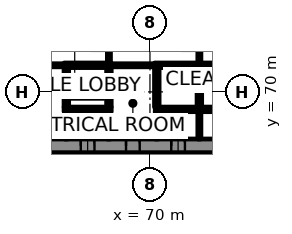
"""IFC4 building model, lengths in metres.
Left out: names, types, materials, properties, quantities, classifications, styles, units other than length and angle.
Written with IfcOpenShell. Run it as: python <this file> out.ifc"""

import sys

from ifc_helpers import new_model, si_unit, direction, frame, frame_2d, origin, place, context, subcontext, project, spatial, rectangle, extrude, element, fill, save


model = new_model("IFC4")
c1 = context("Model", 3, precision=1e-05, world=origin(), true_north=direction((0.0, 1.0)))
c2 = subcontext(c1, "Body", "Model", "MODEL_VIEW")
j1 = project(units=[si_unit("LENGTHUNIT", "METRE"), si_unit("PLANEANGLEUNIT", "RADIAN")], contexts=[c1])
p1 = place(None, origin())
s1 = spatial("IfcSite", under=j1, at=p1, CompositionType="ELEMENT")
p2 = place(p1, origin())
s2 = spatial("IfcBuilding", under=s1, at=p2, CompositionType="ELEMENT")
p3 = place(p2, origin())
s3 = spatial("IfcBuildingStorey", under=s2, at=p3, CompositionType="ELEMENT", Elevation=0.0)
p4 = place(p3, frame((62.0, 66.45, 0.0), z_axis=(0.0, 0.0, 1.0), x_axis=(1.0, 0.0, 0.0)))
e1 = element("IfcWall", 1, at=p4, inside=s3, PredefinedType="SHEAR", context=c2, shape_type="SweptSolid", body=[
    extrude(rectangle(XDim=26.0, YDim=0.9, at=frame_2d((13.0, 0.0))), origin(), (0.0, 0.0, 1.0), 7.7),
])
p5 = place(p4, frame((3.45, 0.0, 0.0)))
e2 = element("IfcOpeningElement", 2, at=p5, cuts=e1, PredefinedType="OPENING", context=c2, shape_type="SweptSolid", body=[
    extrude(rectangle(XDim=0.9, YDim=2.1, at=frame_2d((0.45, 1.05))), frame((0.0, 0.46, 0.0), z_axis=(0.0, -1.0, 0.0), x_axis=(1.0, 0.0, 0.0)), (0.0, 0.0, 1.0), 0.92),
])
p6 = place(p4, frame((6.425, 0.0, 0.0)))
e3 = element("IfcOpeningElement", 3, at=p6, cuts=e1, PredefinedType="OPENING", context=c2, shape_type="SweptSolid", body=[
    extrude(rectangle(XDim=0.9, YDim=2.1, at=frame_2d((0.45, 1.05))), frame((0.0, 0.46, 0.0), z_axis=(0.0, -1.0, 0.0), x_axis=(1.0, 0.0, 0.0)), (0.0, 0.0, 1.0), 0.92),
])
p7 = place(p4, frame((9.4, 0.0, 0.0)))
e4 = element("IfcOpeningElement", 4, at=p7, cuts=e1, PredefinedType="OPENING", context=c2, shape_type="SweptSolid", body=[
    extrude(rectangle(XDim=0.9, YDim=2.1, at=frame_2d((0.45, 1.05))), frame((0.0, 0.46, 0.0), z_axis=(0.0, -1.0, 0.0), x_axis=(1.0, 0.0, 0.0)), (0.0, 0.0, 1.0), 0.92),
])
p8 = place(p4, frame((14.262, 0.0, 0.0)))
e5 = element("IfcOpeningElement", 5, at=p8, cuts=e1, PredefinedType="OPENING", context=c2, shape_type="SweptSolid", body=[
    extrude(rectangle(XDim=0.9, YDim=2.1, at=frame_2d((0.45, 1.05))), frame((0.0, 0.46, 0.0), z_axis=(0.0, -1.0, 0.0), x_axis=(1.0, 0.0, 0.0)), (0.0, 0.0, 1.0), 0.92),
])
p9 = place(p4, frame((21.188, 0.0, 0.0)))
e6 = element("IfcOpeningElement", 6, at=p9, cuts=e1, PredefinedType="OPENING", context=c2, shape_type="SweptSolid", body=[
    extrude(rectangle(XDim=0.9, YDim=2.1, at=frame_2d((0.45, 1.05))), frame((0.0, 0.46, 0.0), z_axis=(0.0, -1.0, 0.0), x_axis=(1.0, 0.0, 0.0)), (0.0, 0.0, 1.0), 0.92),
])
p10 = place(p3, frame((64.35, 68.85, 0.0), z_axis=(0.0, 0.0, 1.0), x_axis=(1.0, 0.0, 0.0)))
e7 = element("IfcWall", 7, at=p10, inside=s3, PredefinedType="SHEAR", context=c2, shape_type="SweptSolid", body=[
    extrude(rectangle(XDim=3.1, YDim=0.3, at=frame_2d((1.55, 0.0))), origin(), (0.0, 0.0, 1.0), 7.7),
])
p11 = place(p3, frame((70.35, 68.85, 0.0), z_axis=(0.0, 0.0, 1.0), x_axis=(1.0, 0.0, 0.0)))
e8 = element("IfcWall", 8, at=p11, inside=s3, PredefinedType="SHEAR", context=c2, shape_type="SweptSolid", body=[
    extrude(rectangle(XDim=16.75, YDim=0.3, at=frame_2d((8.375, 0.0))), origin(), (0.0, 0.0, 1.0), 7.7),
])
p12 = place(p3, frame((64.35, 71.75, 0.0), z_axis=(0.0, 0.0, 1.0), x_axis=(1.0, 0.0, 0.0)))
e9 = element("IfcWall", 9, at=p12, inside=s3, PredefinedType="SHEAR", context=c2, shape_type="SweptSolid", body=[
    extrude(rectangle(XDim=3.1, YDim=0.3, at=frame_2d((1.55, 0.0))), origin(), (0.0, 0.0, 1.0), 7.7),
])
p13 = place(p12, frame((1.0, 0.0, 0.0)))
e10 = element("IfcOpeningElement", 10, at=p13, cuts=e9, PredefinedType="OPENING", context=c2, shape_type="SweptSolid", body=[
    extrude(rectangle(XDim=1.1, YDim=2.1, at=frame_2d((0.55, 1.05))), frame((0.0, 0.16, 0.0), z_axis=(0.0, -1.0, 0.0), x_axis=(1.0, 0.0, 0.0)), (0.0, 0.0, 1.0), 0.32),
])
p14 = place(p3, frame((70.3, 71.75, 0.0), z_axis=(0.0, 0.0, 1.0), x_axis=(1.0, 0.0, 0.0)))
e11 = element("IfcWall", 11, at=p14, inside=s3, PredefinedType="SHEAR", context=c2, shape_type="SweptSolid", body=[
    extrude(rectangle(XDim=16.8, YDim=0.3, at=frame_2d((8.4, 0.0))), origin(), (0.0, 0.0, 1.0), 7.7),
])
p15 = place(p14, frame((1.0, 0.0, 0.0)))
e12 = element("IfcOpeningElement", 12, at=p15, cuts=e11, PredefinedType="OPENING", context=c2, shape_type="SweptSolid", body=[
    extrude(rectangle(XDim=1.1, YDim=2.1, at=frame_2d((0.55, 1.05))), frame((0.0, 0.16, 0.0), z_axis=(0.0, -1.0, 0.0), x_axis=(1.0, 0.0, 0.0)), (0.0, 0.0, 1.0), 0.32),
])
p16 = place(p14, frame((3.8, 0.0, 0.0)))
e13 = element("IfcOpeningElement", 13, at=p16, cuts=e11, PredefinedType="OPENING", context=c2, shape_type="SweptSolid", body=[
    extrude(rectangle(XDim=1.1, YDim=2.1, at=frame_2d((0.55, 1.05))), frame((0.0, 0.16, 0.0), z_axis=(0.0, -1.0, 0.0), x_axis=(1.0, 0.0, 0.0)), (0.0, 0.0, 1.0), 0.32),
])
p17 = place(p14, frame((6.6, 0.0, 0.0)))
e14 = element("IfcOpeningElement", 14, at=p17, cuts=e11, PredefinedType="OPENING", context=c2, shape_type="SweptSolid", body=[
    extrude(rectangle(XDim=1.1, YDim=2.1, at=frame_2d((0.55, 1.05))), frame((0.0, 0.16, 0.0), z_axis=(0.0, -1.0, 0.0), x_axis=(1.0, 0.0, 0.0)), (0.0, 0.0, 1.0), 0.32),
])
p18 = place(p14, frame((9.4, 0.0, 0.0)))
e15 = element("IfcOpeningElement", 15, at=p18, cuts=e11, PredefinedType="OPENING", context=c2, shape_type="SweptSolid", body=[
    extrude(rectangle(XDim=1.1, YDim=2.1, at=frame_2d((0.55, 1.05))), frame((0.0, 0.16, 0.0), z_axis=(0.0, -1.0, 0.0), x_axis=(1.0, 0.0, 0.0)), (0.0, 0.0, 1.0), 0.32),
])
p19 = place(p14, frame((12.2, 0.0, 0.0)))
e16 = element("IfcOpeningElement", 16, at=p19, cuts=e11, PredefinedType="OPENING", context=c2, shape_type="SweptSolid", body=[
    extrude(rectangle(XDim=1.1, YDim=2.1, at=frame_2d((0.55, 1.05))), frame((0.0, 0.16, 0.0), z_axis=(0.0, -1.0, 0.0), x_axis=(1.0, 0.0, 0.0)), (0.0, 0.0, 1.0), 0.32),
])
p20 = place(p14, frame((14.925, 0.0, 0.0)))
e17 = element("IfcOpeningElement", 17, at=p20, cuts=e11, PredefinedType="OPENING", context=c2, shape_type="SweptSolid", body=[
    extrude(rectangle(XDim=1.1, YDim=2.1, at=frame_2d((0.55, 1.05))), frame((0.0, 0.16, 0.0), z_axis=(0.0, -1.0, 0.0), x_axis=(1.0, 0.0, 0.0)), (0.0, 0.0, 1.0), 0.32),
])
for number, where, z_axis, x_axis in (
    (18, (64.5, 69.0, 0.0), (0.0, 0.0, 1.0), (0.0, 1.0, 0.0)),
    (19, (67.3, 69.0, 0.0), (0.0, 0.0, 1.0), (0.0, 1.0, 0.0)),
    (20, (70.45, 69.0, 0.0), (0.0, 0.0, 1.0), (0.0, 1.0, 0.0)),
    (21, (73.25, 69.0, 0.0), (0.0, 0.0, 1.0), (0.0, 1.0, 0.0)),
):
    element("IfcWall", number, at=place(p3, frame(where, z_axis=z_axis, x_axis=x_axis)), inside=s3, PredefinedType="SHEAR", context=c2, shape_type="SweptSolid", body=[
        extrude(rectangle(XDim=2.6, YDim=0.3, at=frame_2d((1.3, 0.0))), origin(), (0.0, 0.0, 1.0), 7.7),
    ])
p21 = place(p3, frame((71.348, 110.424, 0.0), z_axis=(0.0, 0.0, 1.0), x_axis=(-0.500000550228, -0.86602508611, 0.0)))
e22 = element("IfcWall", 22, at=p21, inside=s3, PredefinedType="SOLIDWALL", context=c2, shape_type="SweptSolid", body=[
    extrude(rectangle(XDim=57.704, YDim=0.3, at=frame_2d((28.852, 0.0))), origin(), (0.0, 0.0, 1.0), 7.7),
])
p22 = place(p21, frame((16.711, 0.0, 0.0)))
e23 = element("IfcOpeningElement", 23, at=p22, cuts=e22, PredefinedType="OPENING", context=c2, shape_type="SweptSolid", body=[
    extrude(rectangle(XDim=1.2, YDim=2.4, at=frame_2d((0.6, 1.2))), frame((0.0, 0.16, 0.0), z_axis=(0.0, -1.0, 0.0), x_axis=(1.0, 0.0, 0.0)), (0.0, 0.0, 1.0), 0.32),
])
p23 = place(p21, frame((1.552, 0.0, 0.15)))
e24 = element("IfcOpeningElement", 24, at=p23, cuts=e22, PredefinedType="OPENING", context=c2, shape_type="SweptSolid", body=[
    extrude(rectangle(XDim=2.1, YDim=5.4, at=frame_2d((1.05, 2.7))), frame((0.0, 0.16, 0.0), z_axis=(0.0, -1.0, 0.0), x_axis=(1.0, 0.0, 0.0)), (0.0, 0.0, 1.0), 0.32),
])
p24 = place(p21, frame((4.052, 0.0, 0.15)))
e25 = element("IfcOpeningElement", 25, at=p24, cuts=e22, PredefinedType="OPENING", context=c2, shape_type="SweptSolid", body=[
    extrude(rectangle(XDim=2.1, YDim=5.4, at=frame_2d((1.05, 2.7))), frame((0.0, 0.16, 0.0), z_axis=(0.0, -1.0, 0.0), x_axis=(1.0, 0.0, 0.0)), (0.0, 0.0, 1.0), 0.32),
])
p25 = place(p21, frame((6.552, 0.0, 0.15)))
e26 = element("IfcOpeningElement", 26, at=p25, cuts=e22, PredefinedType="OPENING", context=c2, shape_type="SweptSolid", body=[
    extrude(rectangle(XDim=2.1, YDim=5.4, at=frame_2d((1.05, 2.7))), frame((0.0, 0.16, 0.0), z_axis=(0.0, -1.0, 0.0), x_axis=(1.0, 0.0, 0.0)), (0.0, 0.0, 1.0), 0.32),
])
p26 = place(p21, frame((9.052, 0.0, 0.15)))
e27 = element("IfcOpeningElement", 27, at=p26, cuts=e22, PredefinedType="OPENING", context=c2, shape_type="SweptSolid", body=[
    extrude(rectangle(XDim=2.1, YDim=5.4, at=frame_2d((1.05, 2.7))), frame((0.0, 0.16, 0.0), z_axis=(0.0, -1.0, 0.0), x_axis=(1.0, 0.0, 0.0)), (0.0, 0.0, 1.0), 0.32),
])
p27 = place(p21, frame((11.552, 0.0, 0.15)))
e28 = element("IfcOpeningElement", 28, at=p27, cuts=e22, PredefinedType="OPENING", context=c2, shape_type="SweptSolid", body=[
    extrude(rectangle(XDim=2.1, YDim=5.4, at=frame_2d((1.05, 2.7))), frame((0.0, 0.16, 0.0), z_axis=(0.0, -1.0, 0.0), x_axis=(1.0, 0.0, 0.0)), (0.0, 0.0, 1.0), 0.32),
])
p28 = place(p21, frame((14.052, 0.0, 0.15)))
e29 = element("IfcOpeningElement", 29, at=p28, cuts=e22, PredefinedType="OPENING", context=c2, shape_type="SweptSolid", body=[
    extrude(rectangle(XDim=2.1, YDim=5.4, at=frame_2d((1.05, 2.7))), frame((0.0, 0.16, 0.0), z_axis=(0.0, -1.0, 0.0), x_axis=(1.0, 0.0, 0.0)), (0.0, 0.0, 1.0), 0.32),
])
p29 = place(p21, frame((19.052, 0.0, 0.15)))
e30 = element("IfcOpeningElement", 30, at=p29, cuts=e22, PredefinedType="OPENING", context=c2, shape_type="SweptSolid", body=[
    extrude(rectangle(XDim=2.1, YDim=5.4, at=frame_2d((1.05, 2.7))), frame((0.0, 0.16, 0.0), z_axis=(0.0, -1.0, 0.0), x_axis=(1.0, 0.0, 0.0)), (0.0, 0.0, 1.0), 0.32),
])
p30 = place(p21, frame((21.552, 0.0, 0.15)))
e31 = element("IfcOpeningElement", 31, at=p30, cuts=e22, PredefinedType="OPENING", context=c2, shape_type="SweptSolid", body=[
    extrude(rectangle(XDim=2.1, YDim=5.4, at=frame_2d((1.05, 2.7))), frame((0.0, 0.16, 0.0), z_axis=(0.0, -1.0, 0.0), x_axis=(1.0, 0.0, 0.0)), (0.0, 0.0, 1.0), 0.32),
])
p31 = place(p21, frame((24.052, 0.0, 0.15)))
e32 = element("IfcOpeningElement", 32, at=p31, cuts=e22, PredefinedType="OPENING", context=c2, shape_type="SweptSolid", body=[
    extrude(rectangle(XDim=2.1, YDim=5.4, at=frame_2d((1.05, 2.7))), frame((0.0, 0.16, 0.0), z_axis=(0.0, -1.0, 0.0), x_axis=(1.0, 0.0, 0.0)), (0.0, 0.0, 1.0), 0.32),
])
p32 = place(p21, frame((26.552, 0.0, 0.15)))
e33 = element("IfcOpeningElement", 33, at=p32, cuts=e22, PredefinedType="OPENING", context=c2, shape_type="SweptSolid", body=[
    extrude(rectangle(XDim=2.1, YDim=5.4, at=frame_2d((1.05, 2.7))), frame((0.0, 0.16, 0.0), z_axis=(0.0, -1.0, 0.0), x_axis=(1.0, 0.0, 0.0)), (0.0, 0.0, 1.0), 0.32),
])
p33 = place(p21, frame((29.052, 0.0, 0.15)))
e34 = element("IfcOpeningElement", 34, at=p33, cuts=e22, PredefinedType="OPENING", context=c2, shape_type="SweptSolid", body=[
    extrude(rectangle(XDim=2.1, YDim=5.4, at=frame_2d((1.05, 2.7))), frame((0.0, 0.16, 0.0), z_axis=(0.0, -1.0, 0.0), x_axis=(1.0, 0.0, 0.0)), (0.0, 0.0, 1.0), 0.32),
])
p34 = place(p21, frame((31.552, 0.0, 0.15)))
e35 = element("IfcOpeningElement", 35, at=p34, cuts=e22, PredefinedType="OPENING", context=c2, shape_type="SweptSolid", body=[
    extrude(rectangle(XDim=2.1, YDim=5.4, at=frame_2d((1.05, 2.7))), frame((0.0, 0.16, 0.0), z_axis=(0.0, -1.0, 0.0), x_axis=(1.0, 0.0, 0.0)), (0.0, 0.0, 1.0), 0.32),
])
p35 = place(p21, frame((34.052, 0.0, 0.15)))
e36 = element("IfcOpeningElement", 36, at=p35, cuts=e22, PredefinedType="OPENING", context=c2, shape_type="SweptSolid", body=[
    extrude(rectangle(XDim=2.1, YDim=5.4, at=frame_2d((1.05, 2.7))), frame((0.0, 0.16, 0.0), z_axis=(0.0, -1.0, 0.0), x_axis=(1.0, 0.0, 0.0)), (0.0, 0.0, 1.0), 0.32),
])
p36 = place(p21, frame((36.552, 0.0, 0.15)))
e37 = element("IfcOpeningElement", 37, at=p36, cuts=e22, PredefinedType="OPENING", context=c2, shape_type="SweptSolid", body=[
    extrude(rectangle(XDim=2.1, YDim=5.4, at=frame_2d((1.05, 2.7))), frame((0.0, 0.16, 0.0), z_axis=(0.0, -1.0, 0.0), x_axis=(1.0, 0.0, 0.0)), (0.0, 0.0, 1.0), 0.32),
])
p37 = place(p21, frame((39.052, 0.0, 0.15)))
e38 = element("IfcOpeningElement", 38, at=p37, cuts=e22, PredefinedType="OPENING", context=c2, shape_type="SweptSolid", body=[
    extrude(rectangle(XDim=2.1, YDim=5.4, at=frame_2d((1.05, 2.7))), frame((0.0, 0.16, 0.0), z_axis=(0.0, -1.0, 0.0), x_axis=(1.0, 0.0, 0.0)), (0.0, 0.0, 1.0), 0.32),
])
p38 = place(p21, frame((41.552, 0.0, 0.15)))
e39 = element("IfcOpeningElement", 39, at=p38, cuts=e22, PredefinedType="OPENING", context=c2, shape_type="SweptSolid", body=[
    extrude(rectangle(XDim=2.1, YDim=5.4, at=frame_2d((1.05, 2.7))), frame((0.0, 0.16, 0.0), z_axis=(0.0, -1.0, 0.0), x_axis=(1.0, 0.0, 0.0)), (0.0, 0.0, 1.0), 0.32),
])
p39 = place(p21, frame((44.052, 0.0, 0.15)))
e40 = element("IfcOpeningElement", 40, at=p39, cuts=e22, PredefinedType="OPENING", context=c2, shape_type="SweptSolid", body=[
    extrude(rectangle(XDim=2.1, YDim=5.4, at=frame_2d((1.05, 2.7))), frame((0.0, 0.16, 0.0), z_axis=(0.0, -1.0, 0.0), x_axis=(1.0, 0.0, 0.0)), (0.0, 0.0, 1.0), 0.32),
])
p40 = place(p21, frame((46.552, 0.0, 0.15)))
e41 = element("IfcOpeningElement", 41, at=p40, cuts=e22, PredefinedType="OPENING", context=c2, shape_type="SweptSolid", body=[
    extrude(rectangle(XDim=2.1, YDim=5.4, at=frame_2d((1.05, 2.7))), frame((0.0, 0.16, 0.0), z_axis=(0.0, -1.0, 0.0), x_axis=(1.0, 0.0, 0.0)), (0.0, 0.0, 1.0), 0.32),
])
p41 = place(p21, frame((49.052, 0.0, 0.15)))
e42 = element("IfcOpeningElement", 42, at=p41, cuts=e22, PredefinedType="OPENING", context=c2, shape_type="SweptSolid", body=[
    extrude(rectangle(XDim=2.1, YDim=5.4, at=frame_2d((1.05, 2.7))), frame((0.0, 0.16, 0.0), z_axis=(0.0, -1.0, 0.0), x_axis=(1.0, 0.0, 0.0)), (0.0, 0.0, 1.0), 0.32),
])
p42 = place(p21, frame((51.552, 0.0, 0.15)))
e43 = element("IfcOpeningElement", 43, at=p42, cuts=e22, PredefinedType="OPENING", context=c2, shape_type="SweptSolid", body=[
    extrude(rectangle(XDim=2.1, YDim=5.4, at=frame_2d((1.05, 2.7))), frame((0.0, 0.16, 0.0), z_axis=(0.0, -1.0, 0.0), x_axis=(1.0, 0.0, 0.0)), (0.0, 0.0, 1.0), 0.32),
])
p43 = place(p21, frame((54.052, 0.0, 0.15)))
e44 = element("IfcOpeningElement", 44, at=p43, cuts=e22, PredefinedType="OPENING", context=c2, shape_type="SweptSolid", body=[
    extrude(rectangle(XDim=2.1, YDim=5.4, at=frame_2d((1.05, 2.7))), frame((0.0, 0.16, 0.0), z_axis=(0.0, -1.0, 0.0), x_axis=(1.0, 0.0, 0.0)), (0.0, 0.0, 1.0), 0.32),
])
p44 = place(p3, frame((62.9, 71.75, 0.0), z_axis=(0.0, 0.0, 1.0), x_axis=(1.0, 0.0, 0.0)))
e45 = element("IfcWall", 45, at=p44, inside=s3, PredefinedType="PARTITIONING", context=c2, shape_type="SweptSolid", body=[
    extrude(rectangle(XDim=1.45, YDim=0.2, at=frame_2d((0.725, 0.0))), origin(), (0.0, 0.0, 1.0), 7.7),
])
p45 = place(p3, frame((67.45, 71.75, 0.0), z_axis=(0.0, 0.0, 1.0), x_axis=(1.0, 0.0, 0.0)))
e46 = element("IfcWall", 46, at=p45, inside=s3, PredefinedType="PARTITIONING", context=c2, shape_type="SweptSolid", body=[
    extrude(rectangle(XDim=2.85, YDim=0.2, at=frame_2d((1.425, 0.0))), origin(), (0.0, 0.0, 1.0), 7.7),
])
for number, where, z_axis, x_axis in (
    (47, (64.5, 66.9, 0.0), (0.0, 0.0, 1.0), (0.0, 1.0, 0.0)),
    (48, (67.3, 66.9, 0.0), (0.0, 0.0, 1.0), (0.0, 1.0, 0.0)),
):
    element("IfcWall", number, at=place(p3, frame(where, z_axis=z_axis, x_axis=x_axis)), inside=s3, PredefinedType="PARTITIONING", context=c2, shape_type="SweptSolid", body=[
        extrude(rectangle(XDim=1.8, YDim=0.2, at=frame_2d((0.9, 0.0))), origin(), (0.0, 0.0, 1.0), 7.7),
    ])
p46 = place(p3, frame((67.3, 71.9, 0.0), z_axis=(0.0, 0.0, 1.0), x_axis=(0.0, 1.0, 0.0)))
e49 = element("IfcWall", 49, at=p46, inside=s3, PredefinedType="PARTITIONING", context=c2, shape_type="SweptSolid", body=[
    extrude(rectangle(XDim=2.8, YDim=0.2, at=frame_2d((1.4, 0.0))), origin(), (0.0, 0.0, 1.0), 7.7),
])
p47 = place(p46, frame((0.8, 0.0, 0.0)))
e50 = element("IfcOpeningElement", 50, at=p47, cuts=e49, PredefinedType="OPENING", context=c2, shape_type="SweptSolid", body=[
    extrude(rectangle(XDim=1.2, YDim=2.1, at=frame_2d((0.6, 1.05))), frame((0.0, 0.11, 0.0), z_axis=(0.0, -1.0, 0.0), x_axis=(1.0, 0.0, 0.0)), (0.0, 0.0, 1.0), 0.22),
])
for number, where, z_axis, x_axis in (
    (51, (70.45, 66.9, 0.0), (0.0, 0.0, 1.0), (0.0, 1.0, 0.0)),
    (52, (73.25, 66.9, 0.0), (0.0, 0.0, 1.0), (0.0, 1.0, 0.0)),
):
    element("IfcWall", number, at=place(p3, frame(where, z_axis=z_axis, x_axis=x_axis)), inside=s3, PredefinedType="PARTITIONING", context=c2, shape_type="SweptSolid", body=[
        extrude(rectangle(XDim=1.8, YDim=0.2, at=frame_2d((0.9, 0.0))), origin(), (0.0, 0.0, 1.0), 7.7),
    ])
p48 = place(p3, frame((73.25, 71.9, 0.0), z_axis=(0.0, 0.0, 1.0), x_axis=(0.0, 1.0, 0.0)))
e53 = element("IfcWall", 53, at=p48, inside=s3, PredefinedType="PARTITIONING", context=c2, shape_type="SweptSolid", body=[
    extrude(rectangle(XDim=2.8, YDim=0.2, at=frame_2d((1.4, 0.0))), origin(), (0.0, 0.0, 1.0), 7.7),
])
p49 = place(p48, frame((0.8, 0.0, 0.0)))
e54 = element("IfcOpeningElement", 54, at=p49, cuts=e53, PredefinedType="OPENING", context=c2, shape_type="SweptSolid", body=[
    extrude(rectangle(XDim=1.2, YDim=2.1, at=frame_2d((0.6, 1.05))), frame((0.0, 0.11, 0.0), z_axis=(0.0, -1.0, 0.0), x_axis=(1.0, 0.0, 0.0)), (0.0, 0.0, 1.0), 0.22),
])
p50 = place(p13, origin())
e55 = element("IfcDoor", 55, at=p50, inside=s3, OperationType="DOUBLE_DOOR_SLIDING", PredefinedType="DOOR", context=c2, shape_type="SweptSolid", body=[
    extrude(rectangle(XDim=1.1, YDim=2.1, at=frame_2d((0.55, 1.05))), frame((0.0, 0.025, 0.0), z_axis=(0.0, -1.0, 0.0), x_axis=(1.0, 0.0, 0.0)), (0.0, 0.0, 1.0), 0.05),
])
fill(e10, e55)
p51 = place(p15, origin())
e56 = element("IfcDoor", 56, at=p51, inside=s3, OperationType="DOUBLE_DOOR_SLIDING", PredefinedType="DOOR", context=c2, shape_type="SweptSolid", body=[
    extrude(rectangle(XDim=1.1, YDim=2.1, at=frame_2d((0.55, 1.05))), frame((0.0, 0.025, 0.0), z_axis=(0.0, -1.0, 0.0), x_axis=(1.0, 0.0, 0.0)), (0.0, 0.0, 1.0), 0.05),
])
fill(e12, e56)
p52 = place(p16, origin())
e57 = element("IfcDoor", 57, at=p52, inside=s3, OperationType="DOUBLE_DOOR_SLIDING", PredefinedType="DOOR", context=c2, shape_type="SweptSolid", body=[
    extrude(rectangle(XDim=1.1, YDim=2.1, at=frame_2d((0.55, 1.05))), frame((0.0, 0.025, 0.0), z_axis=(0.0, -1.0, 0.0), x_axis=(1.0, 0.0, 0.0)), (0.0, 0.0, 1.0), 0.05),
])
fill(e13, e57)
p53 = place(p5, origin())
e58 = element("IfcDoor", 58, at=p53, inside=s3, OperationType="SINGLE_SWING_LEFT", PredefinedType="DOOR", context=c2, shape_type="SweptSolid", body=[
    extrude(rectangle(XDim=0.9, YDim=2.1, at=frame_2d((0.45, 1.05))), frame((0.0, 0.17, 0.0), z_axis=(0.0, -1.0, 0.0), x_axis=(1.0, 0.0, 0.0)), (0.0, 0.0, 1.0), 0.34),
])
fill(e2, e58)
p54 = place(p6, origin())
e59 = element("IfcDoor", 59, at=p54, inside=s3, OperationType="SINGLE_SWING_RIGHT", PredefinedType="DOOR", context=c2, shape_type="SweptSolid", body=[
    extrude(rectangle(XDim=0.9, YDim=2.1, at=frame_2d((0.45, 1.05))), frame((0.0, 0.17, 0.0), z_axis=(0.0, -1.0, 0.0), x_axis=(1.0, 0.0, 0.0)), (0.0, 0.0, 1.0), 0.34),
])
fill(e3, e59)
p55 = place(p7, origin())
e60 = element("IfcDoor", 60, at=p55, inside=s3, OperationType="SINGLE_SWING_LEFT", PredefinedType="DOOR", context=c2, shape_type="SweptSolid", body=[
    extrude(rectangle(XDim=0.9, YDim=2.1, at=frame_2d((0.45, 1.05))), frame((0.0, 0.17, 0.0), z_axis=(0.0, -1.0, 0.0), x_axis=(1.0, 0.0, 0.0)), (0.0, 0.0, 1.0), 0.34),
])
fill(e4, e60)
save(model, sys.argv[1])
